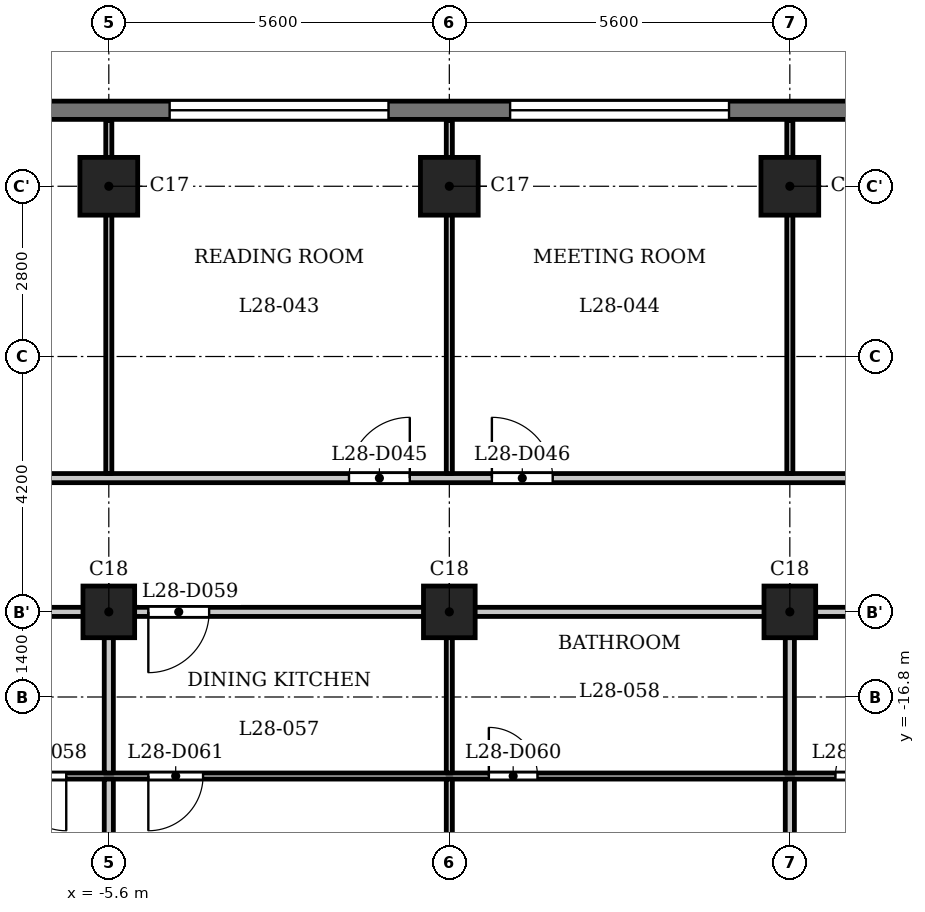
"""IFC4 building model, lengths in metres.
Left out: names, types, materials, properties, quantities, classifications, styles, units other than length and angle.
Written with IfcOpenShell. Run it as: python <this file> out.ifc"""

import sys

from ifc_helpers import new_model, si_unit, direction, frame, frame_2d, origin, origin_2d, place, context, subcontext, project, spatial, rectangle, extrude, element, fill, save


model = new_model("IFC4")
c1 = context("Model", 3, precision=1e-05, world=origin(), true_north=direction((0.0, 1.0)))
c2 = subcontext(c1, "Body", "Model", "MODEL_VIEW")
j1 = project(units=[si_unit("LENGTHUNIT", "METRE"), si_unit("PLANEANGLEUNIT", "RADIAN")], contexts=[c1])
p1 = place(None, origin())
s1 = spatial("IfcSite", under=j1, at=p1, CompositionType="ELEMENT")
p2 = place(p1, origin())
s2 = spatial("IfcBuilding", under=s1, at=p2, CompositionType="ELEMENT")
p3 = place(p2, frame((0.0, 0.0, 111.3)))
s3 = spatial("IfcBuildingStorey", under=s2, at=p3, CompositionType="ELEMENT", Elevation=111.3)
for number, where, z_axis, x_axis in (
    (1, (-5.6, -8.4, 0.0), (0.0, 0.0, 1.0), (1.0, 0.0, 0.0)),
    (2, (0.0, -8.4, 0.0), (0.0, 0.0, 1.0), (1.0, 0.0, 0.0)),
    (3, (5.6, -8.4, 0.0), (0.0, 0.0, 1.0), (1.0, 0.0, 0.0)),
):
    element("IfcColumn", number, at=place(p3, frame(where, z_axis=z_axis, x_axis=x_axis)), inside=s3, PredefinedType="COLUMN", context=c2, shape_type="SweptSolid", body=[
        extrude(rectangle(XDim=0.95, YDim=0.95, at=origin_2d()), origin(), (0.0, 0.0, 1.0), 3.5),
    ])
for number, where, z_axis, x_axis in (
    (4, (-5.6, -15.4, 0.0), (0.0, 0.0, 1.0), (1.0, 0.0, 0.0)),
    (5, (0.0, -15.4, 0.0), (0.0, 0.0, 1.0), (1.0, 0.0, 0.0)),
    (6, (5.6, -15.4, 0.0), (0.0, 0.0, 1.0), (1.0, 0.0, 0.0)),
):
    element("IfcColumn", number, at=place(p3, frame(where, z_axis=z_axis, x_axis=x_axis)), inside=s3, PredefinedType="COLUMN", context=c2, shape_type="SweptSolid", body=[
        extrude(rectangle(XDim=0.85, YDim=0.85, at=origin_2d()), origin(), (0.0, 0.0, 1.0), 3.5),
    ])
p4 = place(p3, frame((13.8, -7.15, 0.0), z_axis=(0.0, 0.0, 1.0), x_axis=(-1.0, 0.0, 0.0)))
e7 = element("IfcWall", 7, at=p4, inside=s3, PredefinedType="SOLIDWALL", context=c2, shape_type="SweptSolid", body=[
    extrude(rectangle(XDim=27.6, YDim=0.3, at=frame_2d((13.8, 0.0))), origin(), (0.0, 0.0, 1.0), 3.2),
])
p5 = place(p4, frame((0.363, 0.0, 0.9)))
e8 = element("IfcOpeningElement", 8, at=p5, cuts=e7, PredefinedType="OPENING", context=c2, shape_type="SweptSolid", body=[
    extrude(rectangle(XDim=1.8, YDim=1.25, at=frame_2d((0.9, 0.625))), frame((0.0, 0.16, 0.0), z_axis=(0.0, -1.0, 0.0), x_axis=(1.0, 0.0, 0.0)), (0.0, 0.0, 1.0), 0.32),
])
p6 = place(p4, frame((3.6, 0.0, 1.2)))
e9 = element("IfcOpeningElement", 9, at=p6, cuts=e7, PredefinedType="OPENING", context=c2, shape_type="SweptSolid", body=[
    extrude(rectangle(XDim=3.6, YDim=0.95, at=frame_2d((1.8, 0.475))), frame((0.0, 0.16, 0.0), z_axis=(0.0, -1.0, 0.0), x_axis=(1.0, 0.0, 0.0)), (0.0, 0.0, 1.0), 0.32),
])
p7 = place(p4, frame((9.2, 0.0, 1.2)))
e10 = element("IfcOpeningElement", 10, at=p7, cuts=e7, PredefinedType="OPENING", context=c2, shape_type="SweptSolid", body=[
    extrude(rectangle(XDim=3.6, YDim=0.95, at=frame_2d((1.8, 0.475))), frame((0.0, 0.16, 0.0), z_axis=(0.0, -1.0, 0.0), x_axis=(1.0, 0.0, 0.0)), (0.0, 0.0, 1.0), 0.32),
])
p8 = place(p4, frame((14.8, 0.0, 1.2)))
e11 = element("IfcOpeningElement", 11, at=p8, cuts=e7, PredefinedType="OPENING", context=c2, shape_type="SweptSolid", body=[
    extrude(rectangle(XDim=3.6, YDim=0.95, at=frame_2d((1.8, 0.475))), frame((0.0, 0.16, 0.0), z_axis=(0.0, -1.0, 0.0), x_axis=(1.0, 0.0, 0.0)), (0.0, 0.0, 1.0), 0.32),
])
p9 = place(p4, frame((20.4, 0.0, 1.2)))
e12 = element("IfcOpeningElement", 12, at=p9, cuts=e7, PredefinedType="OPENING", context=c2, shape_type="SweptSolid", body=[
    extrude(rectangle(XDim=3.6, YDim=0.95, at=frame_2d((1.8, 0.475))), frame((0.0, 0.16, 0.0), z_axis=(0.0, -1.0, 0.0), x_axis=(1.0, 0.0, 0.0)), (0.0, 0.0, 1.0), 0.32),
])
p10 = place(p4, frame((25.438, 0.0, 0.9)))
e13 = element("IfcOpeningElement", 13, at=p10, cuts=e7, PredefinedType="OPENING", context=c2, shape_type="SweptSolid", body=[
    extrude(rectangle(XDim=1.8, YDim=1.25, at=frame_2d((0.9, 0.625))), frame((0.0, 0.16, 0.0), z_axis=(0.0, -1.0, 0.0), x_axis=(1.0, 0.0, 0.0)), (0.0, 0.0, 1.0), 0.32),
])
p11 = place(p3, frame((-26.19, -18.1, 0.0), z_axis=(0.0, 0.0, 1.0), x_axis=(1.0, 0.0, 0.0)))
e14 = element("IfcWall", 14, at=p11, inside=s3, PredefinedType="PARTITIONING", context=c2, shape_type="SweptSolid", body=[
    extrude(rectangle(XDim=52.63, YDim=0.1, at=frame_2d((26.315, 0.0))), origin(), (0.0, 0.0, 1.0), 3.2),
])
p12 = place(p11, frame((1.09, 0.0, 0.0)))
e15 = element("IfcOpeningElement", 15, at=p12, cuts=e14, PredefinedType="OPENING", context=c2, shape_type="SweptSolid", body=[
    extrude(rectangle(XDim=0.8, YDim=2.1, at=frame_2d((0.4, 1.05))), frame((0.0, 0.06, 0.0), z_axis=(0.0, -1.0, 0.0), x_axis=(1.0, 0.0, 0.0)), (0.0, 0.0, 1.0), 0.12),
])
p13 = place(p11, frame((4.44, 0.0, 0.0)))
e16 = element("IfcOpeningElement", 16, at=p13, cuts=e14, PredefinedType="OPENING", context=c2, shape_type="SweptSolid", body=[
    extrude(rectangle(XDim=0.9, YDim=2.1, at=frame_2d((0.45, 1.05))), frame((0.0, 0.06, 0.0), z_axis=(0.0, -1.0, 0.0), x_axis=(1.0, 0.0, 0.0)), (0.0, 0.0, 1.0), 0.12),
])
p14 = place(p11, frame((10.14, 0.0, 0.0)))
e17 = element("IfcOpeningElement", 17, at=p14, cuts=e14, PredefinedType="OPENING", context=c2, shape_type="SweptSolid", body=[
    extrude(rectangle(XDim=0.8, YDim=2.1, at=frame_2d((0.4, 1.05))), frame((0.0, 0.06, 0.0), z_axis=(0.0, -1.0, 0.0), x_axis=(1.0, 0.0, 0.0)), (0.0, 0.0, 1.0), 0.12),
])
p15 = place(p11, frame((12.74, 0.0, 0.0)))
e18 = element("IfcOpeningElement", 18, at=p15, cuts=e14, PredefinedType="OPENING", context=c2, shape_type="SweptSolid", body=[
    extrude(rectangle(XDim=0.9, YDim=2.1, at=frame_2d((0.45, 1.05))), frame((0.0, 0.06, 0.0), z_axis=(0.0, -1.0, 0.0), x_axis=(1.0, 0.0, 0.0)), (0.0, 0.0, 1.0), 0.12),
])
p16 = place(p11, frame((16.14, 0.0, 0.0)))
e19 = element("IfcOpeningElement", 19, at=p16, cuts=e14, PredefinedType="OPENING", context=c2, shape_type="SweptSolid", body=[
    extrude(rectangle(XDim=0.9, YDim=2.1, at=frame_2d((0.45, 1.05))), frame((0.0, 0.06, 0.0), z_axis=(0.0, -1.0, 0.0), x_axis=(1.0, 0.0, 0.0)), (0.0, 0.0, 1.0), 0.12),
])
p17 = place(p11, frame((18.99, 0.0, 0.0)))
e20 = element("IfcOpeningElement", 20, at=p17, cuts=e14, PredefinedType="OPENING", context=c2, shape_type="SweptSolid", body=[
    extrude(rectangle(XDim=0.9, YDim=2.1, at=frame_2d((0.45, 1.05))), frame((0.0, 0.06, 0.0), z_axis=(0.0, -1.0, 0.0), x_axis=(1.0, 0.0, 0.0)), (0.0, 0.0, 1.0), 0.12),
])
p18 = place(p11, frame((26.84, 0.0, 0.0)))
e21 = element("IfcOpeningElement", 21, at=p18, cuts=e14, PredefinedType="OPENING", context=c2, shape_type="SweptSolid", body=[
    extrude(rectangle(XDim=0.8, YDim=2.1, at=frame_2d((0.4, 1.05))), frame((0.0, 0.06, 0.0), z_axis=(0.0, -1.0, 0.0), x_axis=(1.0, 0.0, 0.0)), (0.0, 0.0, 1.0), 0.12),
])
p19 = place(p11, frame((21.24, 0.0, 0.0)))
e22 = element("IfcOpeningElement", 22, at=p19, cuts=e14, PredefinedType="OPENING", context=c2, shape_type="SweptSolid", body=[
    extrude(rectangle(XDim=0.9, YDim=2.1, at=frame_2d((0.45, 1.05))), frame((0.0, 0.06, 0.0), z_axis=(0.0, -1.0, 0.0), x_axis=(1.0, 0.0, 0.0)), (0.0, 0.0, 1.0), 0.12),
])
p20 = place(p11, frame((32.54, 0.0, 0.0)))
e23 = element("IfcOpeningElement", 23, at=p20, cuts=e14, PredefinedType="OPENING", context=c2, shape_type="SweptSolid", body=[
    extrude(rectangle(XDim=0.8, YDim=2.1, at=frame_2d((0.4, 1.05))), frame((0.0, 0.06, 0.0), z_axis=(0.0, -1.0, 0.0), x_axis=(1.0, 0.0, 0.0)), (0.0, 0.0, 1.0), 0.12),
])
p21 = place(p11, frame((35.14, 0.0, 0.0)))
e24 = element("IfcOpeningElement", 24, at=p21, cuts=e14, PredefinedType="OPENING", context=c2, shape_type="SweptSolid", body=[
    extrude(rectangle(XDim=0.9, YDim=2.1, at=frame_2d((0.45, 1.05))), frame((0.0, 0.06, 0.0), z_axis=(0.0, -1.0, 0.0), x_axis=(1.0, 0.0, 0.0)), (0.0, 0.0, 1.0), 0.12),
])
p22 = place(p11, frame((38.54, 0.0, 0.0)))
e25 = element("IfcOpeningElement", 25, at=p22, cuts=e14, PredefinedType="OPENING", context=c2, shape_type="SweptSolid", body=[
    extrude(rectangle(XDim=0.9, YDim=2.1, at=frame_2d((0.45, 1.05))), frame((0.0, 0.06, 0.0), z_axis=(0.0, -1.0, 0.0), x_axis=(1.0, 0.0, 0.0)), (0.0, 0.0, 1.0), 0.12),
])
p23 = place(p11, frame((41.39, 0.0, 0.0)))
e26 = element("IfcOpeningElement", 26, at=p23, cuts=e14, PredefinedType="OPENING", context=c2, shape_type="SweptSolid", body=[
    extrude(rectangle(XDim=0.9, YDim=2.1, at=frame_2d((0.45, 1.05))), frame((0.0, 0.06, 0.0), z_axis=(0.0, -1.0, 0.0), x_axis=(1.0, 0.0, 0.0)), (0.0, 0.0, 1.0), 0.12),
])
p24 = place(p11, frame((49.204, 0.0, 0.0)))
e27 = element("IfcOpeningElement", 27, at=p24, cuts=e14, PredefinedType="OPENING", context=c2, shape_type="SweptSolid", body=[
    extrude(rectangle(XDim=0.8, YDim=2.1, at=frame_2d((0.4, 1.05))), frame((0.0, 0.06, 0.0), z_axis=(0.0, -1.0, 0.0), x_axis=(1.0, 0.0, 0.0)), (0.0, 0.0, 1.0), 0.12),
])
p25 = place(p11, frame((43.64, 0.0, 0.0)))
e28 = element("IfcOpeningElement", 28, at=p25, cuts=e14, PredefinedType="OPENING", context=c2, shape_type="SweptSolid", body=[
    extrude(rectangle(XDim=0.9, YDim=2.1, at=frame_2d((0.45, 1.05))), frame((0.0, 0.06, 0.0), z_axis=(0.0, -1.0, 0.0), x_axis=(1.0, 0.0, 0.0)), (0.0, 0.0, 1.0), 0.12),
])
p26 = place(p3, frame((-27.484, -15.4, 0.0), z_axis=(0.0, 0.0, 1.0), x_axis=(1.0, 0.0, 0.0)))
e29 = element("IfcWall", 29, at=p26, inside=s3, PredefinedType="PARTITIONING", context=c2, shape_type="SweptSolid", body=[
    extrude(rectangle(XDim=54.968, YDim=0.15, at=frame_2d((27.484, 0.0))), origin(), (0.0, 0.0, 1.0), 3.2),
])
p27 = place(p26, frame((5.734, 0.0, 0.0)))
e30 = element("IfcOpeningElement", 30, at=p27, cuts=e29, PredefinedType="OPENING", context=c2, shape_type="SweptSolid", body=[
    extrude(rectangle(XDim=1.0, YDim=2.1, at=frame_2d((0.5, 1.05))), frame((0.0, 0.085, 0.0), z_axis=(0.0, -1.0, 0.0), x_axis=(1.0, 0.0, 0.0)), (0.0, 0.0, 1.0), 0.17),
])
p28 = place(p26, frame((16.934, 0.0, 0.0)))
e31 = element("IfcOpeningElement", 31, at=p28, cuts=e29, PredefinedType="OPENING", context=c2, shape_type="SweptSolid", body=[
    extrude(rectangle(XDim=1.0, YDim=2.1, at=frame_2d((0.5, 1.05))), frame((0.0, 0.085, 0.0), z_axis=(0.0, -1.0, 0.0), x_axis=(1.0, 0.0, 0.0)), (0.0, 0.0, 1.0), 0.17),
])
p29 = place(p26, frame((22.534, 0.0, 0.0)))
e32 = element("IfcOpeningElement", 32, at=p29, cuts=e29, PredefinedType="OPENING", context=c2, shape_type="SweptSolid", body=[
    extrude(rectangle(XDim=1.0, YDim=2.1, at=frame_2d((0.5, 1.05))), frame((0.0, 0.085, 0.0), z_axis=(0.0, -1.0, 0.0), x_axis=(1.0, 0.0, 0.0)), (0.0, 0.0, 1.0), 0.17),
])
p30 = place(p26, frame((39.334, 0.0, 0.0)))
e33 = element("IfcOpeningElement", 33, at=p30, cuts=e29, PredefinedType="OPENING", context=c2, shape_type="SweptSolid", body=[
    extrude(rectangle(XDim=1.0, YDim=2.1, at=frame_2d((0.5, 1.05))), frame((0.0, 0.085, 0.0), z_axis=(0.0, -1.0, 0.0), x_axis=(1.0, 0.0, 0.0)), (0.0, 0.0, 1.0), 0.17),
])
p31 = place(p26, frame((44.934, 0.0, 0.0)))
e34 = element("IfcOpeningElement", 34, at=p31, cuts=e29, PredefinedType="OPENING", context=c2, shape_type="SweptSolid", body=[
    extrude(rectangle(XDim=1.0, YDim=2.1, at=frame_2d((0.5, 1.05))), frame((0.0, 0.085, 0.0), z_axis=(0.0, -1.0, 0.0), x_axis=(1.0, 0.0, 0.0)), (0.0, 0.0, 1.0), 0.17),
])
p32 = place(p3, frame((-17.4, -13.2, 0.0), z_axis=(0.0, 0.0, 1.0), x_axis=(1.0, 0.0, 0.0)))
e35 = element("IfcWall", 35, at=p32, inside=s3, PredefinedType="PARTITIONING", context=c2, shape_type="SweptSolid", body=[
    extrude(rectangle(XDim=34.8, YDim=0.15, at=frame_2d((17.4, 0.0))), origin(), (0.0, 0.0, 1.0), 3.2),
])
p33 = place(p32, frame((0.65, 0.0, 0.0)))
e36 = element("IfcOpeningElement", 36, at=p33, cuts=e35, PredefinedType="OPENING", context=c2, shape_type="SweptSolid", body=[
    extrude(rectangle(XDim=1.0, YDim=2.1, at=frame_2d((0.5, 1.05))), frame((0.0, 0.085, 0.0), z_axis=(0.0, -1.0, 0.0), x_axis=(1.0, 0.0, 0.0)), (0.0, 0.0, 1.0), 0.17),
])
p34 = place(p32, frame((33.05, 0.0, 0.0)))
e37 = element("IfcOpeningElement", 37, at=p34, cuts=e35, PredefinedType="OPENING", context=c2, shape_type="SweptSolid", body=[
    extrude(rectangle(XDim=1.0, YDim=2.1, at=frame_2d((0.5, 1.05))), frame((0.0, 0.085, 0.0), z_axis=(0.0, -1.0, 0.0), x_axis=(1.0, 0.0, 0.0)), (0.0, 0.0, 1.0), 0.17),
])
p35 = place(p32, frame((4.55, 0.0, 0.0)))
e38 = element("IfcOpeningElement", 38, at=p35, cuts=e35, PredefinedType="OPENING", context=c2, shape_type="SweptSolid", body=[
    extrude(rectangle(XDim=1.0, YDim=2.1, at=frame_2d((0.5, 1.05))), frame((0.0, 0.085, 0.0), z_axis=(0.0, -1.0, 0.0), x_axis=(1.0, 0.0, 0.0)), (0.0, 0.0, 1.0), 0.17),
])
p36 = place(p32, frame((6.9, 0.0, 0.0)))
e39 = element("IfcOpeningElement", 39, at=p36, cuts=e35, PredefinedType="OPENING", context=c2, shape_type="SweptSolid", body=[
    extrude(rectangle(XDim=1.0, YDim=2.1, at=frame_2d((0.5, 1.05))), frame((0.0, 0.085, 0.0), z_axis=(0.0, -1.0, 0.0), x_axis=(1.0, 0.0, 0.0)), (0.0, 0.0, 1.0), 0.17),
])
p37 = place(p32, frame((15.75, 0.0, 0.0)))
e40 = element("IfcOpeningElement", 40, at=p37, cuts=e35, PredefinedType="OPENING", context=c2, shape_type="SweptSolid", body=[
    extrude(rectangle(XDim=1.0, YDim=2.1, at=frame_2d((0.5, 1.05))), frame((0.0, 0.085, 0.0), z_axis=(0.0, -1.0, 0.0), x_axis=(1.0, 0.0, 0.0)), (0.0, 0.0, 1.0), 0.17),
])
p38 = place(p32, frame((18.1, 0.0, 0.0)))
e41 = element("IfcOpeningElement", 41, at=p38, cuts=e35, PredefinedType="OPENING", context=c2, shape_type="SweptSolid", body=[
    extrude(rectangle(XDim=1.0, YDim=2.1, at=frame_2d((0.5, 1.05))), frame((0.0, 0.085, 0.0), z_axis=(0.0, -1.0, 0.0), x_axis=(1.0, 0.0, 0.0)), (0.0, 0.0, 1.0), 0.17),
])
p39 = place(p32, frame((26.95, 0.0, 0.0)))
e42 = element("IfcOpeningElement", 42, at=p39, cuts=e35, PredefinedType="OPENING", context=c2, shape_type="SweptSolid", body=[
    extrude(rectangle(XDim=1.0, YDim=2.1, at=frame_2d((0.5, 1.05))), frame((0.0, 0.085, 0.0), z_axis=(0.0, -1.0, 0.0), x_axis=(1.0, 0.0, 0.0)), (0.0, 0.0, 1.0), 0.17),
])
p40 = place(p32, frame((29.25, 0.0, 0.0)))
e43 = element("IfcOpeningElement", 43, at=p40, cuts=e35, PredefinedType="OPENING", context=c2, shape_type="SweptSolid", body=[
    extrude(rectangle(XDim=1.0, YDim=2.1, at=frame_2d((0.5, 1.05))), frame((0.0, 0.085, 0.0), z_axis=(0.0, -1.0, 0.0), x_axis=(1.0, 0.0, 0.0)), (0.0, 0.0, 1.0), 0.17),
])
p41 = place(p3, frame((-5.6, -13.125, 0.0), z_axis=(0.0, 0.0, 1.0), x_axis=(0.0, 1.0, 0.0)))
e44 = element("IfcWall", 44, at=p41, inside=s3, PredefinedType="PARTITIONING", context=c2, shape_type="SweptSolid", body=[
    extrude(rectangle(XDim=5.805, YDim=0.1, at=frame_2d((2.902, 0.0))), origin(), (0.0, 0.0, 1.0), 3.2),
])
p42 = place(p3, frame((-5.6, -22.98, 0.0), z_axis=(0.0, 0.0, 1.0), x_axis=(0.0, 1.0, 0.0)))
e45 = element("IfcWall", 45, at=p42, inside=s3, PredefinedType="PARTITIONING", context=c2, shape_type="SweptSolid", body=[
    extrude(rectangle(XDim=4.83, YDim=0.15, at=frame_2d((2.415, 0.0))), origin(), (0.0, 0.0, 1.0), 3.2),
])
p43 = place(p3, frame((-5.6, -18.05, 0.0), z_axis=(0.0, 0.0, 1.0), x_axis=(0.0, 1.0, 0.0)))
e46 = element("IfcWall", 46, at=p43, inside=s3, PredefinedType="PARTITIONING", context=c2, shape_type="SweptSolid", body=[
    extrude(rectangle(XDim=2.575, YDim=0.15, at=frame_2d((1.288, 0.0))), origin(), (0.0, 0.0, 1.0), 3.2),
])
p44 = place(p3, frame((0.0, -22.98, 0.0), z_axis=(0.0, 0.0, 1.0), x_axis=(0.0, 1.0, 0.0)))
e47 = element("IfcWall", 47, at=p44, inside=s3, PredefinedType="PARTITIONING", context=c2, shape_type="SweptSolid", body=[
    extrude(rectangle(XDim=4.83, YDim=0.1, at=frame_2d((2.415, 0.0))), origin(), (0.0, 0.0, 1.0), 3.2),
])
p45 = place(p44, frame((2.57, 0.0, 0.0)))
e48 = element("IfcOpeningElement", 48, at=p45, cuts=e47, PredefinedType="OPENING", context=c2, shape_type="SweptSolid", body=[
    extrude(rectangle(XDim=0.9, YDim=2.1, at=frame_2d((0.45, 1.05))), frame((0.0, 0.06, 0.0), z_axis=(0.0, -1.0, 0.0), x_axis=(1.0, 0.0, 0.0)), (0.0, 0.0, 1.0), 0.12),
])
p46 = place(p3, frame((0.0, -18.05, 0.0), z_axis=(0.0, 0.0, 1.0), x_axis=(0.0, 1.0, 0.0)))
e49 = element("IfcWall", 49, at=p46, inside=s3, PredefinedType="PARTITIONING", context=c2, shape_type="SweptSolid", body=[
    extrude(rectangle(XDim=2.575, YDim=0.1, at=frame_2d((1.288, 0.0))), origin(), (0.0, 0.0, 1.0), 3.2),
])
for number, where, z_axis, x_axis in (
    (50, (0.0, -13.125, 0.0), (0.0, 0.0, 1.0), (0.0, 1.0, 0.0)),
    (51, (5.6, -13.125, 0.0), (0.0, 0.0, 1.0), (0.0, 1.0, 0.0)),
):
    element("IfcWall", number, at=place(p3, frame(where, z_axis=z_axis, x_axis=x_axis)), inside=s3, PredefinedType="PARTITIONING", context=c2, shape_type="SweptSolid", body=[
        extrude(rectangle(XDim=5.805, YDim=0.1, at=frame_2d((2.902, 0.0))), origin(), (0.0, 0.0, 1.0), 3.2),
    ])
p47 = place(p3, frame((5.6, -22.98, 0.0), z_axis=(0.0, 0.0, 1.0), x_axis=(0.0, 1.0, 0.0)))
e52 = element("IfcWall", 52, at=p47, inside=s3, PredefinedType="PARTITIONING", context=c2, shape_type="SweptSolid", body=[
    extrude(rectangle(XDim=4.83, YDim=0.15, at=frame_2d((2.415, 0.0))), origin(), (0.0, 0.0, 1.0), 3.2),
])
p48 = place(p3, frame((5.6, -18.05, 0.0), z_axis=(0.0, 0.0, 1.0), x_axis=(0.0, 1.0, 0.0)))
e53 = element("IfcWall", 53, at=p48, inside=s3, PredefinedType="PARTITIONING", context=c2, shape_type="SweptSolid", body=[
    extrude(rectangle(XDim=2.575, YDim=0.15, at=frame_2d((1.288, 0.0))), origin(), (0.0, 0.0, 1.0), 3.2),
])
p49 = place(p37, origin())
e54 = element("IfcDoor", 54, at=p49, inside=s3, OperationType="SINGLE_SWING_LEFT", PredefinedType="DOOR", context=c2, shape_type="SweptSolid", body=[
    extrude(rectangle(XDim=1.0, YDim=2.1, at=frame_2d((0.5, 1.05))), frame((0.0, 0.025, 0.0), z_axis=(0.0, -1.0, 0.0), x_axis=(1.0, 0.0, 0.0)), (0.0, 0.0, 1.0), 0.05),
])
fill(e40, e54)
p50 = place(p38, origin())
e55 = element("IfcDoor", 55, at=p50, inside=s3, OperationType="SINGLE_SWING_RIGHT", PredefinedType="DOOR", context=c2, shape_type="SweptSolid", body=[
    extrude(rectangle(XDim=1.0, YDim=2.1, at=frame_2d((0.5, 1.05))), frame((0.0, 0.025, 0.0), z_axis=(0.0, -1.0, 0.0), x_axis=(1.0, 0.0, 0.0)), (0.0, 0.0, 1.0), 0.05),
])
fill(e41, e55)
p51 = place(p17, origin())
e56 = element("IfcDoor", 56, at=p51, inside=s3, OperationType="SINGLE_SWING_RIGHT", PredefinedType="DOOR", context=c2, shape_type="SweptSolid", body=[
    extrude(rectangle(XDim=0.9, YDim=2.1, at=frame_2d((0.45, 1.05))), frame((0.0, 0.025, 0.0), z_axis=(0.0, -1.0, 0.0), x_axis=(1.0, 0.0, 0.0)), (0.0, 0.0, 1.0), 0.05),
])
fill(e20, e56)
p52 = place(p29, origin())
e57 = element("IfcDoor", 57, at=p52, inside=s3, OperationType="SINGLE_SWING_LEFT", PredefinedType="DOOR", context=c2, shape_type="SweptSolid", body=[
    extrude(rectangle(XDim=1.0, YDim=2.1, at=frame_2d((0.5, 1.05))), frame((0.0, 0.025, 0.0), z_axis=(0.0, -1.0, 0.0), x_axis=(1.0, 0.0, 0.0)), (0.0, 0.0, 1.0), 0.05),
])
fill(e32, e57)
p53 = place(p18, origin())
e58 = element("IfcDoor", 58, at=p53, inside=s3, OperationType="SINGLE_SWING_RIGHT", PredefinedType="DOOR", context=c2, shape_type="SweptSolid", body=[
    extrude(rectangle(XDim=0.8, YDim=2.1, at=frame_2d((0.4, 1.05))), frame((0.0, 0.025, 0.0), z_axis=(0.0, -1.0, 0.0), x_axis=(1.0, 0.0, 0.0)), (0.0, 0.0, 1.0), 0.05),
])
fill(e21, e58)
p54 = place(p19, origin())
e59 = element("IfcDoor", 59, at=p54, inside=s3, OperationType="SINGLE_SWING_LEFT", PredefinedType="DOOR", context=c2, shape_type="SweptSolid", body=[
    extrude(rectangle(XDim=0.9, YDim=2.1, at=frame_2d((0.45, 1.05))), frame((0.0, 0.025, 0.0), z_axis=(0.0, -1.0, 0.0), x_axis=(1.0, 0.0, 0.0)), (0.0, 0.0, 1.0), 0.05),
])
fill(e22, e59)
p55 = place(p20, origin())
e60 = element("IfcDoor", 60, at=p55, inside=s3, OperationType="SINGLE_SWING_LEFT", PredefinedType="DOOR", context=c2, shape_type="SweptSolid", body=[
    extrude(rectangle(XDim=0.8, YDim=2.1, at=frame_2d((0.4, 1.05))), frame((0.0, 0.025, 0.0), z_axis=(0.0, -1.0, 0.0), x_axis=(1.0, 0.0, 0.0)), (0.0, 0.0, 1.0), 0.05),
])
fill(e23, e60)
p56 = place(p7, origin())
e61 = element("IfcWindow", 61, at=p56, inside=s3, PartitioningType="SINGLE_PANEL", PredefinedType="WINDOW", context=c2, shape_type="SweptSolid", body=[
    extrude(rectangle(XDim=3.6, YDim=0.95, at=frame_2d((1.8, 0.475))), frame((0.0, 0.03, 0.0), z_axis=(0.0, -1.0, 0.0), x_axis=(1.0, 0.0, 0.0)), (0.0, 0.0, 1.0), 0.06),
])
fill(e10, e61)
p57 = place(p8, origin())
e62 = element("IfcWindow", 62, at=p57, inside=s3, PartitioningType="SINGLE_PANEL", PredefinedType="WINDOW", context=c2, shape_type="SweptSolid", body=[
    extrude(rectangle(XDim=3.6, YDim=0.95, at=frame_2d((1.8, 0.475))), frame((0.0, 0.03, 0.0), z_axis=(0.0, -1.0, 0.0), x_axis=(1.0, 0.0, 0.0)), (0.0, 0.0, 1.0), 0.06),
])
fill(e11, e62)
save(model, sys.argv[1])
